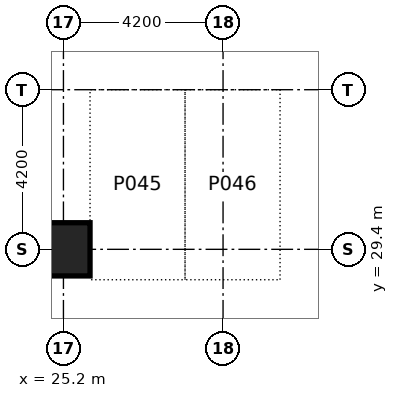
"""IFC4 building model, lengths in metres.
Left out: names, types, materials, properties, quantities, classifications, styles, units other than length and angle.
Written with IfcOpenShell. Run it as: python <this file> out.ifc"""

import sys

from ifc_helpers import new_model, si_unit, direction, frame, origin, origin_2d, place, context, subcontext, project, spatial, rectangle, extrude, element, save


model = new_model("IFC4")
c1 = context("Model", 3, precision=1e-05, world=origin(), true_north=direction((0.0, 1.0)))
c2 = subcontext(c1, "Body", "Model", "MODEL_VIEW")
j1 = project(units=[si_unit("LENGTHUNIT", "METRE"), si_unit("PLANEANGLEUNIT", "RADIAN")], contexts=[c1])
p1 = place(None, origin())
s1 = spatial("IfcSite", under=j1, at=p1, CompositionType="ELEMENT")
p2 = place(p1, origin())
s2 = spatial("IfcBuilding", under=s1, at=p2, CompositionType="ELEMENT")
p3 = place(p2, frame((0.0, 0.0, -8.4)))
s3 = spatial("IfcBuildingStorey", under=s2, at=p3, CompositionType="ELEMENT", Elevation=-8.4)
p4 = place(p3, frame((25.2, 29.4, -0.5), z_axis=(0.0, 0.0, 1.0), x_axis=(1.0, 0.0, 0.0)))
e1 = element("IfcColumn", 1, at=p4, inside=s3, PredefinedType="COLUMN", context=c2, shape_type="SweptSolid", body=[
    extrude(rectangle(XDim=1.4, YDim=1.4, at=origin_2d()), origin(), (0.0, 0.0, 1.0), 4.7),
])
save(model, sys.argv[1])
